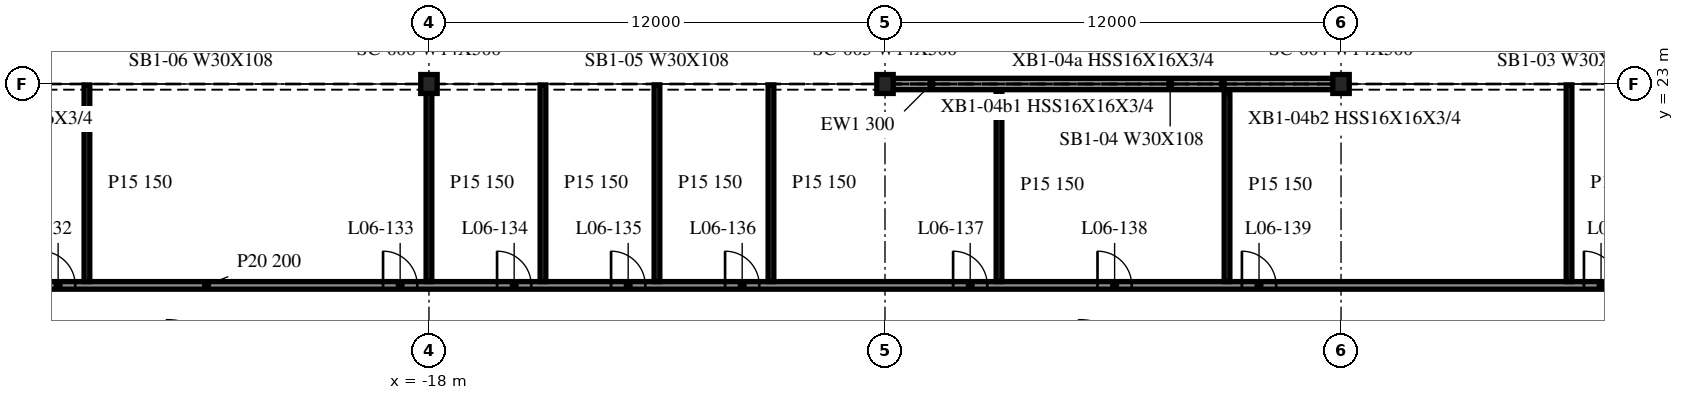
"""IFC4 building model, lengths in metres.
Left out: names, types, materials, properties, quantities, classifications, styles, units other than length and angle.
Written with IfcOpenShell. Run it as: python <this file> out.ifc"""

import sys

from ifc_helpers import new_model, si_unit, direction, frame, frame_2d, origin, origin_2d, place, context, subcontext, project, spatial, rectangle, i_section, extrude, element, fill, save


model = new_model("IFC4")
c1 = context("Model", 3, precision=1e-05, world=origin(), true_north=direction((0.0, 1.0)))
c2 = subcontext(c1, "Body", "Model", "MODEL_VIEW")
j1 = project(units=[si_unit("LENGTHUNIT", "METRE"), si_unit("PLANEANGLEUNIT", "RADIAN")], contexts=[c1])
p1 = place(None, origin())
s1 = spatial("IfcSite", under=j1, at=p1, CompositionType="ELEMENT")
p2 = place(p1, origin())
s2 = spatial("IfcBuilding", under=s1, at=p2, CompositionType="ELEMENT")
p3 = place(p2, frame((0.0, 0.0, 28.7)))
s3 = spatial("IfcBuildingStorey", under=s2, at=p3, CompositionType="ELEMENT", Elevation=28.7)
for number, where, z_axis, x_axis in (
    (1, (6.0, 23.0, -0.34), (0.0, 0.0, 1.0), (1.0, 0.0, 0.0)),
    (2, (-6.0, 23.0, -0.34), (0.0, 0.0, 1.0), (1.0, 0.0, 0.0)),
    (3, (-18.0, 23.0, -0.34), (0.0, 0.0, 1.0), (1.0, 0.0, 0.0)),
):
    element("IfcColumn", number, at=place(p3, frame(where, z_axis=z_axis, x_axis=x_axis)), inside=s3, PredefinedType="COLUMN", context=c2, shape_type="SweptSolid", body=[
        extrude(i_section(OverallWidth=0.432, OverallDepth=0.498, WebThickness=0.056, FlangeThickness=0.089, at=origin_2d()), origin(), (0.0, 0.0, 1.0), 4.3),
    ])
p4 = place(p3, frame((5.972, 23.0, 0.0), z_axis=(0.0, 0.0, 1.0), x_axis=(-1.0, 0.0, 0.0)))
e4 = element("IfcWall", 4, at=p4, inside=s3, PredefinedType="NOTDEFINED", context=c2, shape_type="SweptSolid", body=[
    extrude(rectangle(XDim=11.944, YDim=0.3, at=frame_2d((5.972, 0.0))), origin(), (0.0, 0.0, 1.0), 3.203),
])
p5 = place(p3, frame((-47.708, 17.7, 0.0), z_axis=(0.0, 0.0, 1.0), x_axis=(1.0, 0.0, 0.0)))
e5 = element("IfcWall", 5, at=p5, inside=s3, PredefinedType="PARTITIONING", context=c2, shape_type="SweptSolid", body=[
    extrude(rectangle(XDim=95.416, YDim=0.2, at=frame_2d((47.708, 0.0))), origin(), (0.0, 0.0, 1.0), 3.96),
])
p6 = place(p5, frame((4.5, 0.0, 0.0)))
e6 = element("IfcOpeningElement", 6, at=p6, cuts=e5, PredefinedType="OPENING", context=c2, shape_type="SweptSolid", body=[
    extrude(rectangle(XDim=0.9, YDim=2.1, at=frame_2d((0.45, 1.05))), frame((0.0, 0.11, 0.0), z_axis=(0.0, -1.0, 0.0), x_axis=(1.0, 0.0, 0.0)), (0.0, 0.0, 1.0), 0.22),
])
p7 = place(p5, frame((7.5, 0.0, 0.0)))
e7 = element("IfcOpeningElement", 7, at=p7, cuts=e5, PredefinedType="OPENING", context=c2, shape_type="SweptSolid", body=[
    extrude(rectangle(XDim=0.9, YDim=2.1, at=frame_2d((0.45, 1.05))), frame((0.0, 0.11, 0.0), z_axis=(0.0, -1.0, 0.0), x_axis=(1.0, 0.0, 0.0)), (0.0, 0.0, 1.0), 0.22),
])
p8 = place(p5, frame((13.5, 0.0, 0.0)))
e8 = element("IfcOpeningElement", 8, at=p8, cuts=e5, PredefinedType="OPENING", context=c2, shape_type="SweptSolid", body=[
    extrude(rectangle(XDim=0.9, YDim=2.1, at=frame_2d((0.45, 1.05))), frame((0.0, 0.11, 0.0), z_axis=(0.0, -1.0, 0.0), x_axis=(1.0, 0.0, 0.0)), (0.0, 0.0, 1.0), 0.22),
])
p9 = place(p5, frame((19.5, 0.0, 0.0)))
e9 = element("IfcOpeningElement", 9, at=p9, cuts=e5, PredefinedType="OPENING", context=c2, shape_type="SweptSolid", body=[
    extrude(rectangle(XDim=0.9, YDim=2.1, at=frame_2d((0.45, 1.05))), frame((0.0, 0.11, 0.0), z_axis=(0.0, -1.0, 0.0), x_axis=(1.0, 0.0, 0.0)), (0.0, 0.0, 1.0), 0.22),
])
p10 = place(p5, frame((28.5, 0.0, 0.0)))
e10 = element("IfcOpeningElement", 10, at=p10, cuts=e5, PredefinedType="OPENING", context=c2, shape_type="SweptSolid", body=[
    extrude(rectangle(XDim=0.9, YDim=2.1, at=frame_2d((0.45, 1.05))), frame((0.0, 0.11, 0.0), z_axis=(0.0, -1.0, 0.0), x_axis=(1.0, 0.0, 0.0)), (0.0, 0.0, 1.0), 0.22),
])
p11 = place(p5, frame((31.5, 0.0, 0.0)))
e11 = element("IfcOpeningElement", 11, at=p11, cuts=e5, PredefinedType="OPENING", context=c2, shape_type="SweptSolid", body=[
    extrude(rectangle(XDim=0.9, YDim=2.1, at=frame_2d((0.45, 1.05))), frame((0.0, 0.11, 0.0), z_axis=(0.0, -1.0, 0.0), x_axis=(1.0, 0.0, 0.0)), (0.0, 0.0, 1.0), 0.22),
])
p12 = place(p5, frame((34.5, 0.0, 0.0)))
e12 = element("IfcOpeningElement", 12, at=p12, cuts=e5, PredefinedType="OPENING", context=c2, shape_type="SweptSolid", body=[
    extrude(rectangle(XDim=0.9, YDim=2.1, at=frame_2d((0.45, 1.05))), frame((0.0, 0.11, 0.0), z_axis=(0.0, -1.0, 0.0), x_axis=(1.0, 0.0, 0.0)), (0.0, 0.0, 1.0), 0.22),
])
p13 = place(p5, frame((37.5, 0.0, 0.0)))
e13 = element("IfcOpeningElement", 13, at=p13, cuts=e5, PredefinedType="OPENING", context=c2, shape_type="SweptSolid", body=[
    extrude(rectangle(XDim=0.9, YDim=2.1, at=frame_2d((0.45, 1.05))), frame((0.0, 0.11, 0.0), z_axis=(0.0, -1.0, 0.0), x_axis=(1.0, 0.0, 0.0)), (0.0, 0.0, 1.0), 0.22),
])
p14 = place(p5, frame((43.5, 0.0, 0.0)))
e14 = element("IfcOpeningElement", 14, at=p14, cuts=e5, PredefinedType="OPENING", context=c2, shape_type="SweptSolid", body=[
    extrude(rectangle(XDim=0.9, YDim=2.1, at=frame_2d((0.45, 1.05))), frame((0.0, 0.11, 0.0), z_axis=(0.0, -1.0, 0.0), x_axis=(1.0, 0.0, 0.0)), (0.0, 0.0, 1.0), 0.22),
])
p15 = place(p5, frame((47.3, 0.0, 0.0)))
e15 = element("IfcOpeningElement", 15, at=p15, cuts=e5, PredefinedType="OPENING", context=c2, shape_type="SweptSolid", body=[
    extrude(rectangle(XDim=0.9, YDim=2.1, at=frame_2d((0.45, 1.05))), frame((0.0, 0.11, 0.0), z_axis=(0.0, -1.0, 0.0), x_axis=(1.0, 0.0, 0.0)), (0.0, 0.0, 1.0), 0.22),
])
p16 = place(p5, frame((51.1, 0.0, 0.0)))
e16 = element("IfcOpeningElement", 16, at=p16, cuts=e5, PredefinedType="OPENING", context=c2, shape_type="SweptSolid", body=[
    extrude(rectangle(XDim=0.9, YDim=2.1, at=frame_2d((0.45, 1.05))), frame((0.0, 0.11, 0.0), z_axis=(0.0, -1.0, 0.0), x_axis=(1.0, 0.0, 0.0)), (0.0, 0.0, 1.0), 0.22),
])
p17 = place(p5, frame((60.1, 0.0, 0.0)))
e17 = element("IfcOpeningElement", 17, at=p17, cuts=e5, PredefinedType="OPENING", context=c2, shape_type="SweptSolid", body=[
    extrude(rectangle(XDim=0.9, YDim=2.1, at=frame_2d((0.45, 1.05))), frame((0.0, 0.11, 0.0), z_axis=(0.0, -1.0, 0.0), x_axis=(1.0, 0.0, 0.0)), (0.0, 0.0, 1.0), 0.22),
])
p18 = place(p5, frame((63.1, 0.0, 0.0)))
e18 = element("IfcOpeningElement", 18, at=p18, cuts=e5, PredefinedType="OPENING", context=c2, shape_type="SweptSolid", body=[
    extrude(rectangle(XDim=0.9, YDim=2.1, at=frame_2d((0.45, 1.05))), frame((0.0, 0.11, 0.0), z_axis=(0.0, -1.0, 0.0), x_axis=(1.0, 0.0, 0.0)), (0.0, 0.0, 1.0), 0.22),
])
p19 = place(p5, frame((66.1, 0.0, 0.0)))
e19 = element("IfcOpeningElement", 19, at=p19, cuts=e5, PredefinedType="OPENING", context=c2, shape_type="SweptSolid", body=[
    extrude(rectangle(XDim=0.9, YDim=2.1, at=frame_2d((0.45, 1.05))), frame((0.0, 0.11, 0.0), z_axis=(0.0, -1.0, 0.0), x_axis=(1.0, 0.0, 0.0)), (0.0, 0.0, 1.0), 0.22),
])
p20 = place(p5, frame((69.1, 0.0, 0.0)))
e20 = element("IfcOpeningElement", 20, at=p20, cuts=e5, PredefinedType="OPENING", context=c2, shape_type="SweptSolid", body=[
    extrude(rectangle(XDim=0.9, YDim=2.1, at=frame_2d((0.45, 1.05))), frame((0.0, 0.11, 0.0), z_axis=(0.0, -1.0, 0.0), x_axis=(1.0, 0.0, 0.0)), (0.0, 0.0, 1.0), 0.22),
])
p21 = place(p5, frame((75.1, 0.0, 0.0)))
e21 = element("IfcOpeningElement", 21, at=p21, cuts=e5, PredefinedType="OPENING", context=c2, shape_type="SweptSolid", body=[
    extrude(rectangle(XDim=0.9, YDim=2.1, at=frame_2d((0.45, 1.05))), frame((0.0, 0.11, 0.0), z_axis=(0.0, -1.0, 0.0), x_axis=(1.0, 0.0, 0.0)), (0.0, 0.0, 1.0), 0.22),
])
p22 = place(p5, frame((81.1, 0.0, 0.0)))
e22 = element("IfcOpeningElement", 22, at=p22, cuts=e5, PredefinedType="OPENING", context=c2, shape_type="SweptSolid", body=[
    extrude(rectangle(XDim=0.9, YDim=2.1, at=frame_2d((0.45, 1.05))), frame((0.0, 0.11, 0.0), z_axis=(0.0, -1.0, 0.0), x_axis=(1.0, 0.0, 0.0)), (0.0, 0.0, 1.0), 0.22),
])
p23 = place(p5, frame((90.1, 0.0, 0.0)))
e23 = element("IfcOpeningElement", 23, at=p23, cuts=e5, PredefinedType="OPENING", context=c2, shape_type="SweptSolid", body=[
    extrude(rectangle(XDim=0.9, YDim=2.1, at=frame_2d((0.45, 1.05))), frame((0.0, 0.11, 0.0), z_axis=(0.0, -1.0, 0.0), x_axis=(1.0, 0.0, 0.0)), (0.0, 0.0, 1.0), 0.22),
])
for number, where, z_axis, x_axis in (
    (24, (-27.0, 17.8, 0.0), (0.0, 0.0, 1.0), (0.0, 1.0, 0.0)),
    (25, (-18.0, 17.8, 0.0), (0.0, 0.0, 1.0), (0.0, 1.0, 0.0)),
    (26, (-15.0, 17.8, 0.0), (0.0, 0.0, 1.0), (0.0, 1.0, 0.0)),
    (27, (-12.0, 17.8, 0.0), (0.0, 0.0, 1.0), (0.0, 1.0, 0.0)),
    (28, (-9.0, 17.8, 0.0), (0.0, 0.0, 1.0), (0.0, 1.0, 0.0)),
):
    element("IfcWall", number, at=place(p3, frame(where, z_axis=z_axis, x_axis=x_axis)), inside=s3, PredefinedType="PARTITIONING", context=c2, shape_type="SweptSolid", body=[
        extrude(rectangle(XDim=5.175, YDim=0.15, at=frame_2d((2.587, 0.0))), origin(), (0.0, 0.0, 1.0), 3.96),
    ])
for number, where, z_axis, x_axis in (
    (29, (-3.0, 17.8, 0.0), (0.0, 0.0, 1.0), (0.0, 1.0, 0.0)),
    (30, (3.0, 17.8, 0.0), (0.0, 0.0, 1.0), (0.0, 1.0, 0.0)),
):
    element("IfcWall", number, at=place(p3, frame(where, z_axis=z_axis, x_axis=x_axis)), inside=s3, PredefinedType="PARTITIONING", context=c2, shape_type="SweptSolid", body=[
        extrude(rectangle(XDim=5.05, YDim=0.15, at=frame_2d((2.525, 0.0))), origin(), (0.0, 0.0, 1.0), 3.96),
    ])
p24 = place(p3, frame((12.0, 17.8, 0.0), z_axis=(0.0, 0.0, 1.0), x_axis=(0.0, 1.0, 0.0)))
e31 = element("IfcWall", 31, at=p24, inside=s3, PredefinedType="PARTITIONING", context=c2, shape_type="SweptSolid", body=[
    extrude(rectangle(XDim=5.175, YDim=0.15, at=frame_2d((2.587, 0.0))), origin(), (0.0, 0.0, 1.0), 3.96),
])
p25 = place(p9, origin())
e32 = element("IfcDoor", 32, at=p25, inside=s3, OperationType="SINGLE_SWING_LEFT", PredefinedType="DOOR", context=c2, shape_type="SweptSolid", body=[
    extrude(rectangle(XDim=0.9, YDim=2.1, at=frame_2d((0.45, 1.05))), frame((0.0, 0.025, 0.0), z_axis=(0.0, -1.0, 0.0), x_axis=(1.0, 0.0, 0.0)), (0.0, 0.0, 1.0), 0.05),
])
fill(e9, e32)
p26 = place(p10, origin())
e33 = element("IfcDoor", 33, at=p26, inside=s3, OperationType="SINGLE_SWING_LEFT", PredefinedType="DOOR", context=c2, shape_type="SweptSolid", body=[
    extrude(rectangle(XDim=0.9, YDim=2.1, at=frame_2d((0.45, 1.05))), frame((0.0, 0.025, 0.0), z_axis=(0.0, -1.0, 0.0), x_axis=(1.0, 0.0, 0.0)), (0.0, 0.0, 1.0), 0.05),
])
fill(e10, e33)
p27 = place(p11, origin())
e34 = element("IfcDoor", 34, at=p27, inside=s3, OperationType="SINGLE_SWING_LEFT", PredefinedType="DOOR", context=c2, shape_type="SweptSolid", body=[
    extrude(rectangle(XDim=0.9, YDim=2.1, at=frame_2d((0.45, 1.05))), frame((0.0, 0.025, 0.0), z_axis=(0.0, -1.0, 0.0), x_axis=(1.0, 0.0, 0.0)), (0.0, 0.0, 1.0), 0.05),
])
fill(e11, e34)
p28 = place(p12, origin())
e35 = element("IfcDoor", 35, at=p28, inside=s3, OperationType="SINGLE_SWING_LEFT", PredefinedType="DOOR", context=c2, shape_type="SweptSolid", body=[
    extrude(rectangle(XDim=0.9, YDim=2.1, at=frame_2d((0.45, 1.05))), frame((0.0, 0.025, 0.0), z_axis=(0.0, -1.0, 0.0), x_axis=(1.0, 0.0, 0.0)), (0.0, 0.0, 1.0), 0.05),
])
fill(e12, e35)
p29 = place(p13, origin())
e36 = element("IfcDoor", 36, at=p29, inside=s3, OperationType="SINGLE_SWING_LEFT", PredefinedType="DOOR", context=c2, shape_type="SweptSolid", body=[
    extrude(rectangle(XDim=0.9, YDim=2.1, at=frame_2d((0.45, 1.05))), frame((0.0, 0.025, 0.0), z_axis=(0.0, -1.0, 0.0), x_axis=(1.0, 0.0, 0.0)), (0.0, 0.0, 1.0), 0.05),
])
fill(e13, e36)
p30 = place(p14, origin())
e37 = element("IfcDoor", 37, at=p30, inside=s3, OperationType="SINGLE_SWING_LEFT", PredefinedType="DOOR", context=c2, shape_type="SweptSolid", body=[
    extrude(rectangle(XDim=0.9, YDim=2.1, at=frame_2d((0.45, 1.05))), frame((0.0, 0.025, 0.0), z_axis=(0.0, -1.0, 0.0), x_axis=(1.0, 0.0, 0.0)), (0.0, 0.0, 1.0), 0.05),
])
fill(e14, e37)
p31 = place(p15, origin())
e38 = element("IfcDoor", 38, at=p31, inside=s3, OperationType="SINGLE_SWING_RIGHT", PredefinedType="DOOR", context=c2, shape_type="SweptSolid", body=[
    extrude(rectangle(XDim=0.9, YDim=2.1, at=frame_2d((0.45, 1.05))), frame((0.0, 0.025, 0.0), z_axis=(0.0, -1.0, 0.0), x_axis=(1.0, 0.0, 0.0)), (0.0, 0.0, 1.0), 0.05),
])
fill(e15, e38)
p32 = place(p16, origin())
e39 = element("IfcDoor", 39, at=p32, inside=s3, OperationType="SINGLE_SWING_RIGHT", PredefinedType="DOOR", context=c2, shape_type="SweptSolid", body=[
    extrude(rectangle(XDim=0.9, YDim=2.1, at=frame_2d((0.45, 1.05))), frame((0.0, 0.025, 0.0), z_axis=(0.0, -1.0, 0.0), x_axis=(1.0, 0.0, 0.0)), (0.0, 0.0, 1.0), 0.05),
])
fill(e16, e39)
p33 = place(p17, origin())
e40 = element("IfcDoor", 40, at=p33, inside=s3, OperationType="SINGLE_SWING_RIGHT", PredefinedType="DOOR", context=c2, shape_type="SweptSolid", body=[
    extrude(rectangle(XDim=0.9, YDim=2.1, at=frame_2d((0.45, 1.05))), frame((0.0, 0.025, 0.0), z_axis=(0.0, -1.0, 0.0), x_axis=(1.0, 0.0, 0.0)), (0.0, 0.0, 1.0), 0.05),
])
fill(e17, e40)
save(model, sys.argv[1])
